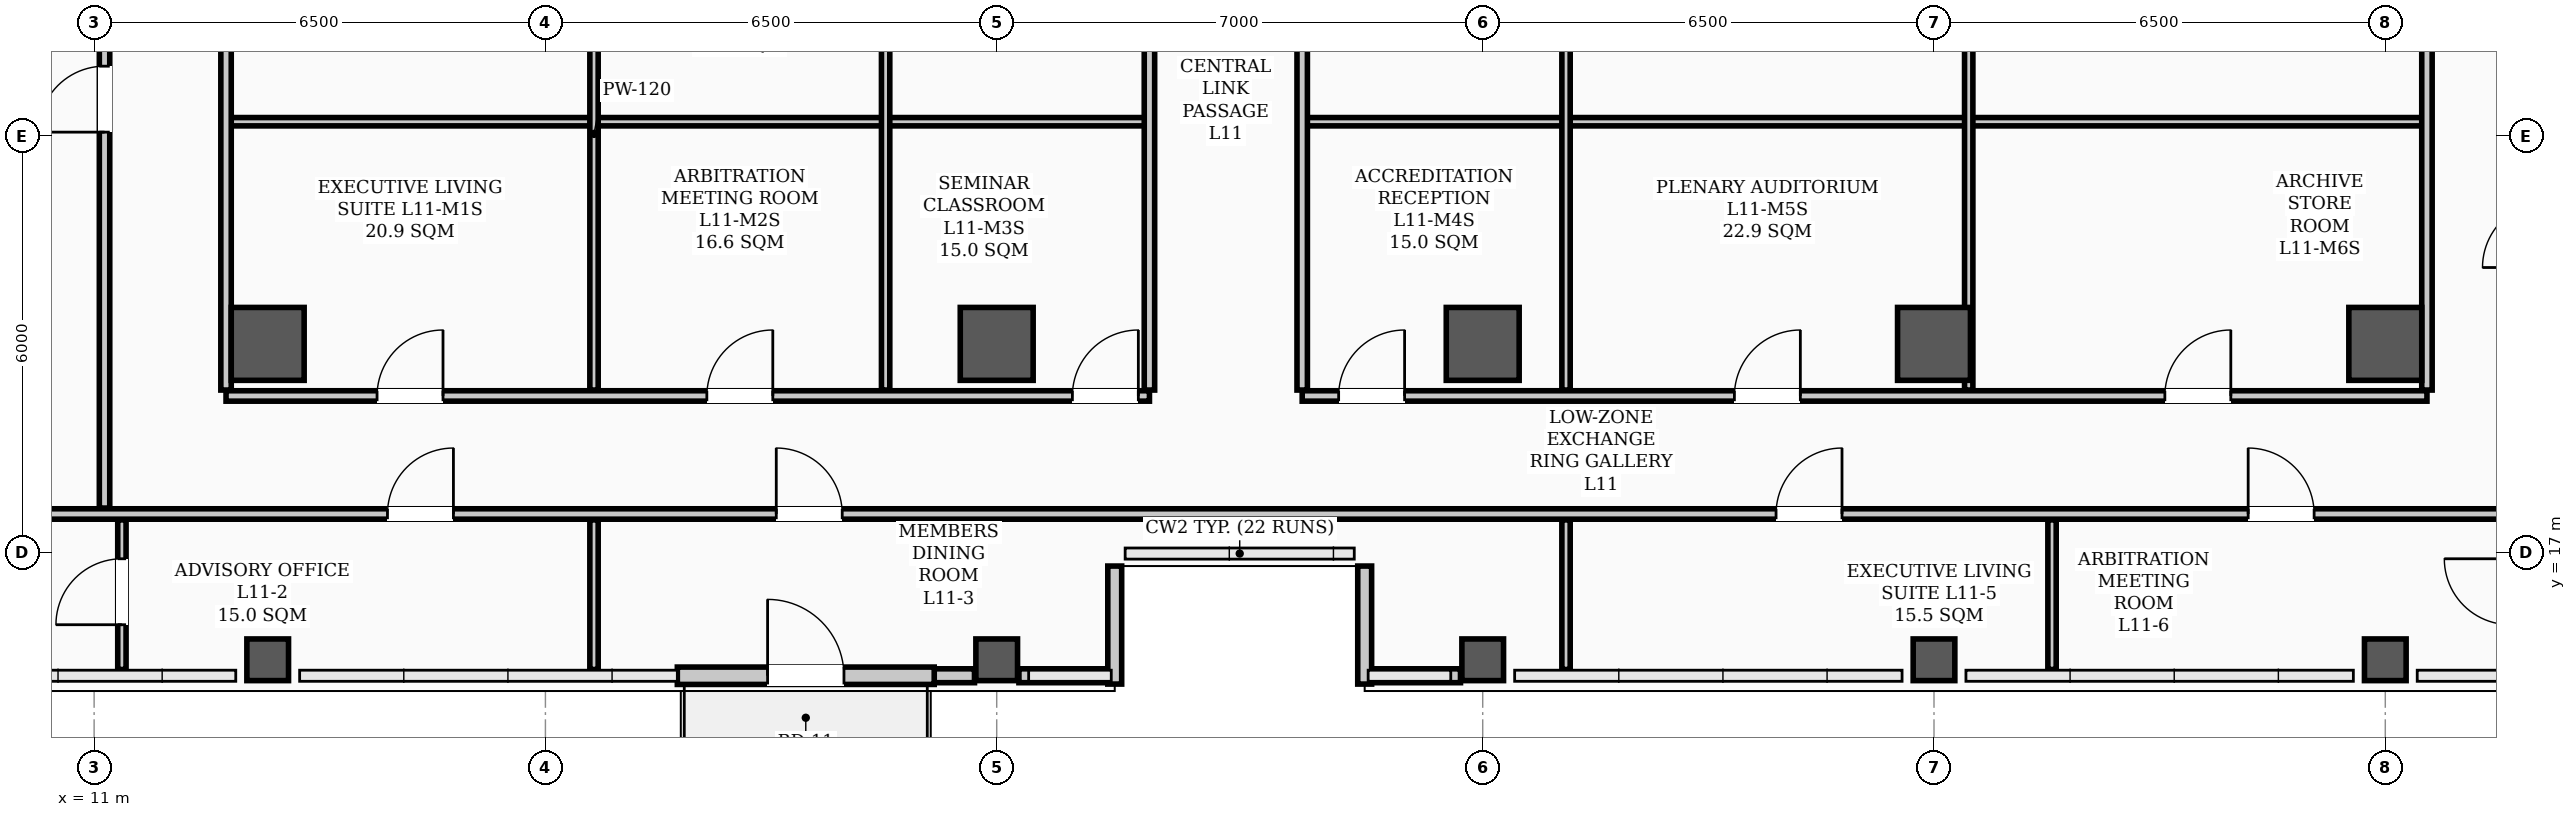
"""IFC4 building model, lengths in metres.
Left out: names, types, materials, properties, quantities, classifications, styles, units other than length and angle.
Written with IfcOpenShell. Run it as: python <this file> out.ifc"""

import sys

from ifc_helpers import new_model, si_unit, direction, frame, frame_2d, origin, origin_2d, place, context, subcontext, project, spatial, rectangle, hollow_rectangle, extrude, element, fill, save


model = new_model("IFC4")
c1 = context("Model", 3, precision=1e-05, world=origin(), true_north=direction((0.0, 1.0)))
c2 = subcontext(c1, "Body", "Model", "MODEL_VIEW")
j1 = project(units=[si_unit("LENGTHUNIT", "METRE"), si_unit("PLANEANGLEUNIT", "RADIAN")], contexts=[c1])
p1 = place(None, origin())
s1 = spatial("IfcSite", under=j1, at=p1, CompositionType="ELEMENT")
p2 = place(p1, origin())
s2 = spatial("IfcBuilding", under=s1, at=p2, CompositionType="ELEMENT")
p3 = place(p2, frame((0.0, 0.0, 46.0)))
s3 = spatial("IfcBuildingStorey", under=s2, at=p3, CompositionType="ELEMENT", Elevation=46.0)
for number, where, z_axis, x_axis in (
    (1, (13.5, 20.0, 0.0), (0.0, 0.0, 1.0), (1.0, 0.0, 0.0)),
    (2, (24.0, 20.0, 0.0), (0.0, 0.0, 1.0), (1.0, 0.0, 0.0)),
    (3, (31.0, 20.0, 0.0), (0.0, 0.0, 1.0), (1.0, 0.0, 0.0)),
    (4, (37.5, 20.0, 0.0), (0.0, 0.0, 1.0), (1.0, 0.0, 0.0)),
    (5, (44.0, 20.0, 0.0), (0.0, 0.0, 1.0), (1.0, 0.0, 0.0)),
):
    element("IfcColumn", number, at=place(p3, frame(where, z_axis=z_axis, x_axis=x_axis)), inside=s3, PredefinedType="COLUMN", context=c2, shape_type="SweptSolid", body=[
        extrude(hollow_rectangle(XDim=1.05, YDim=1.05, WallThickness=0.038, InnerFilletRadius=0.019, OuterFilletRadius=0.057, at=origin_2d()), origin(), (0.0, 0.0, 1.0), 3.9),
    ])
for number, where, z_axis, x_axis in (
    (6, (13.5, 15.45, 0.0), (0.0, 0.0, 1.0), (1.0, 0.0, 0.0)),
    (7, (24.0, 15.45, 0.0), (0.0, 0.0, 1.0), (1.0, 0.0, 0.0)),
    (8, (31.0, 15.45, 0.0), (0.0, 0.0, 1.0), (1.0, 0.0, 0.0)),
    (9, (37.5, 15.45, 0.0), (0.0, 0.0, 1.0), (1.0, 0.0, 0.0)),
    (10, (44.0, 15.45, 0.0), (0.0, 0.0, 1.0), (1.0, 0.0, 0.0)),
):
    element("IfcColumn", number, at=place(p3, frame(where, z_axis=z_axis, x_axis=x_axis)), inside=s3, PredefinedType="COLUMN", context=c2, shape_type="SweptSolid", body=[
        extrude(hollow_rectangle(XDim=0.6, YDim=0.6, WallThickness=0.026, InnerFilletRadius=0.013, OuterFilletRadius=0.039, at=origin_2d()), origin(), (0.0, 0.0, 1.0), 3.9),
    ])
p4 = place(p3, frame((23.1, 15.22, 0.0), z_axis=(0.0, 0.0, 1.0), x_axis=(1.0, 0.0, 0.0)))
e11 = element("IfcWall", 11, at=p4, inside=s3, PredefinedType="PARAPET", context=c2, shape_type="SweptSolid", body=[
    extrude(rectangle(XDim=0.58, YDim=0.2, at=frame_2d((0.29, 0.0))), origin(), (0.0, 0.0, 1.0), 1.2),
])
for number, where, z_axis, x_axis in (
    (12, (24.32, 15.22, 0.0), (0.0, 0.0, 1.0), (1.0, 0.0, 0.0)),
    (13, (29.35, 15.22, 0.0), (0.0, 0.0, 1.0), (1.0, 0.0, 0.0)),
):
    element("IfcWall", number, at=place(p3, frame(where, z_axis=z_axis, x_axis=x_axis)), inside=s3, PredefinedType="PARAPET", context=c2, shape_type="SweptSolid", body=[
        extrude(rectangle(XDim=1.33, YDim=0.2, at=frame_2d((0.665, 0.0))), origin(), (0.0, 0.0, 1.0), 1.2),
    ])
for number, where, z_axis, x_axis in (
    (14, (25.7, 15.1, 0.0), (0.0, 0.0, 1.0), (0.0, 1.0, 0.0)),
    (15, (29.3, 16.8, 0.0), (0.0, 0.0, 1.0), (0.0, -1.0, 0.0)),
):
    element("IfcWall", number, at=place(p3, frame(where, z_axis=z_axis, x_axis=x_axis)), inside=s3, PredefinedType="PARAPET", context=c2, shape_type="SweptSolid", body=[
        extrude(rectangle(XDim=1.7, YDim=0.2, at=frame_2d((0.85, 0.0))), origin(), (0.0, 0.0, 1.0), 1.2),
    ])
p5 = place(p3, frame((19.4, 15.22, 0.0), z_axis=(0.0, 0.0, 1.0), x_axis=(1.0, 0.0, 0.0)))
e16 = element("IfcWall", 16, at=p5, inside=s3, PredefinedType="STANDARD", context=c2, shape_type="SweptSolid", body=[
    extrude(rectangle(XDim=3.7, YDim=0.25, at=frame_2d((1.85, 0.0))), origin(), (0.0, 0.0, 1.0), 3.18),
])
p6 = place(p5, frame((1.3, 0.0, 0.0)))
e17 = element("IfcOpeningElement", 17, at=p6, cuts=e16, PredefinedType="OPENING", context=c2, shape_type="SweptSolid", body=[
    extrude(rectangle(XDim=1.1, YDim=2.2, at=frame_2d((0.55, 1.1))), frame((0.0, 0.135, 0.0), z_axis=(0.0, -1.0, 0.0), x_axis=(1.0, 0.0, 0.0)), (0.0, 0.0, 1.0), 0.27),
])
p7 = place(p3, frame((4.66, 17.55, 0.0), z_axis=(0.0, 0.0, 1.0), x_axis=(1.0, 0.0, 0.0)))
e18 = element("IfcWall", 18, at=p7, inside=s3, PredefinedType="PARTITIONING", context=c2, shape_type="SweptSolid", body=[
    extrude(rectangle(XDim=44.68, YDim=0.15, at=frame_2d((22.34, 0.0))), origin(), (0.0, 0.0, 1.0), 3.1),
])
p8 = place(p7, frame((10.565, 0.0, 0.0)))
e19 = element("IfcOpeningElement", 19, at=p8, cuts=e18, PredefinedType="OPENING", context=c2, shape_type="SweptSolid", body=[
    extrude(rectangle(XDim=0.95, YDim=2.08, at=frame_2d((0.475, 1.04))), frame((0.0, 0.085, 0.0), z_axis=(0.0, -1.0, 0.0), x_axis=(1.0, 0.0, 0.0)), (0.0, 0.0, 1.0), 0.17),
])
p9 = place(p7, frame((16.165, 0.0, 0.0)))
e20 = element("IfcOpeningElement", 20, at=p9, cuts=e18, PredefinedType="OPENING", context=c2, shape_type="SweptSolid", body=[
    extrude(rectangle(XDim=0.95, YDim=2.08, at=frame_2d((0.475, 1.04))), frame((0.0, 0.085, 0.0), z_axis=(0.0, -1.0, 0.0), x_axis=(1.0, 0.0, 0.0)), (0.0, 0.0, 1.0), 0.17),
])
p10 = place(p7, frame((30.565, 0.0, 0.0)))
e21 = element("IfcOpeningElement", 21, at=p10, cuts=e18, PredefinedType="OPENING", context=c2, shape_type="SweptSolid", body=[
    extrude(rectangle(XDim=0.95, YDim=2.08, at=frame_2d((0.475, 1.04))), frame((0.0, 0.085, 0.0), z_axis=(0.0, -1.0, 0.0), x_axis=(1.0, 0.0, 0.0)), (0.0, 0.0, 1.0), 0.17),
])
p11 = place(p7, frame((37.365, 0.0, 0.0)))
e22 = element("IfcOpeningElement", 22, at=p11, cuts=e18, PredefinedType="OPENING", context=c2, shape_type="SweptSolid", body=[
    extrude(rectangle(XDim=0.95, YDim=2.08, at=frame_2d((0.475, 1.04))), frame((0.0, 0.085, 0.0), z_axis=(0.0, -1.0, 0.0), x_axis=(1.0, 0.0, 0.0)), (0.0, 0.0, 1.0), 0.17),
])
p12 = place(p3, frame((12.9, 19.25, 0.0), z_axis=(0.0, 0.0, 1.0), x_axis=(1.0, 0.0, 0.0)))
e23 = element("IfcWall", 23, at=p12, inside=s3, PredefinedType="PARTITIONING", context=c2, shape_type="SweptSolid", body=[
    extrude(rectangle(XDim=13.3, YDim=0.15, at=frame_2d((6.65, 0.0))), origin(), (0.0, 0.0, 1.0), 3.1),
])
p13 = place(p12, frame((2.175, 0.0, 0.0)))
e24 = element("IfcOpeningElement", 24, at=p13, cuts=e23, PredefinedType="OPENING", context=c2, shape_type="SweptSolid", body=[
    extrude(rectangle(XDim=0.95, YDim=2.08, at=frame_2d((0.475, 1.04))), frame((0.0, 0.085, 0.0), z_axis=(0.0, -1.0, 0.0), x_axis=(1.0, 0.0, 0.0)), (0.0, 0.0, 1.0), 0.17),
])
p14 = place(p12, frame((6.925, 0.0, 0.0)))
e25 = element("IfcOpeningElement", 25, at=p14, cuts=e23, PredefinedType="OPENING", context=c2, shape_type="SweptSolid", body=[
    extrude(rectangle(XDim=0.95, YDim=2.08, at=frame_2d((0.475, 1.04))), frame((0.0, 0.085, 0.0), z_axis=(0.0, -1.0, 0.0), x_axis=(1.0, 0.0, 0.0)), (0.0, 0.0, 1.0), 0.17),
])
p15 = place(p12, frame((12.19, 0.0, 0.0)))
e26 = element("IfcOpeningElement", 26, at=p15, cuts=e23, PredefinedType="OPENING", context=c2, shape_type="SweptSolid", body=[
    extrude(rectangle(XDim=0.95, YDim=2.08, at=frame_2d((0.475, 1.04))), frame((0.0, 0.085, 0.0), z_axis=(0.0, -1.0, 0.0), x_axis=(1.0, 0.0, 0.0)), (0.0, 0.0, 1.0), 0.17),
])
p16 = place(p3, frame((28.4, 19.25, 0.0), z_axis=(0.0, 0.0, 1.0), x_axis=(1.0, 0.0, 0.0)))
e27 = element("IfcWall", 27, at=p16, inside=s3, PredefinedType="PARTITIONING", context=c2, shape_type="SweptSolid", body=[
    extrude(rectangle(XDim=16.2, YDim=0.15, at=frame_2d((8.1, 0.0))), origin(), (0.0, 0.0, 1.0), 3.1),
])
p17 = place(p16, frame((0.525, 0.0, 0.0)))
e28 = element("IfcOpeningElement", 28, at=p17, cuts=e27, PredefinedType="OPENING", context=c2, shape_type="SweptSolid", body=[
    extrude(rectangle(XDim=0.95, YDim=2.08, at=frame_2d((0.475, 1.04))), frame((0.0, 0.085, 0.0), z_axis=(0.0, -1.0, 0.0), x_axis=(1.0, 0.0, 0.0)), (0.0, 0.0, 1.0), 0.17),
])
p18 = place(p16, frame((6.225, 0.0, 0.0)))
e29 = element("IfcOpeningElement", 29, at=p18, cuts=e27, PredefinedType="OPENING", context=c2, shape_type="SweptSolid", body=[
    extrude(rectangle(XDim=0.95, YDim=2.08, at=frame_2d((0.475, 1.04))), frame((0.0, 0.085, 0.0), z_axis=(0.0, -1.0, 0.0), x_axis=(1.0, 0.0, 0.0)), (0.0, 0.0, 1.0), 0.17),
])
p19 = place(p16, frame((12.425, 0.0, 0.0)))
e30 = element("IfcOpeningElement", 30, at=p19, cuts=e27, PredefinedType="OPENING", context=c2, shape_type="SweptSolid", body=[
    extrude(rectangle(XDim=0.95, YDim=2.08, at=frame_2d((0.475, 1.04))), frame((0.0, 0.085, 0.0), z_axis=(0.0, -1.0, 0.0), x_axis=(1.0, 0.0, 0.0)), (0.0, 0.0, 1.0), 0.17),
])
p20 = place(p3, frame((12.9, 23.2, 0.0), z_axis=(0.0, 0.0, 1.0), x_axis=(1.0, 0.0, 0.0)))
e31 = element("IfcWall", 31, at=p20, inside=s3, PredefinedType="PARTITIONING", context=c2, shape_type="SweptSolid", body=[
    extrude(rectangle(XDim=5.3, YDim=0.12, at=frame_2d((2.65, 0.0))), origin(), (0.0, 0.0, 1.0), 3.1),
])
p21 = place(p3, frame((18.2, 23.2, 0.0), z_axis=(0.0, 0.0, 1.0), x_axis=(1.0, 0.0, 0.0)))
e32 = element("IfcWall", 32, at=p21, inside=s3, PredefinedType="PARTITIONING", context=c2, shape_type="SweptSolid", body=[
    extrude(rectangle(XDim=4.2, YDim=0.12, at=frame_2d((2.1, 0.0))), origin(), (0.0, 0.0, 1.0), 3.3),
])
for number, where, z_axis, x_axis in (
    (33, (22.4, 23.2, 0.0), (0.0, 0.0, 1.0), (1.0, 0.0, 0.0)),
    (34, (28.4, 23.2, 0.0), (0.0, 0.0, 1.0), (1.0, 0.0, 0.0)),
):
    element("IfcWall", number, at=place(p3, frame(where, z_axis=z_axis, x_axis=x_axis)), inside=s3, PredefinedType="PARTITIONING", context=c2, shape_type="SweptSolid", body=[
        extrude(rectangle(XDim=3.8, YDim=0.12, at=frame_2d((1.9, 0.0))), origin(), (0.0, 0.0, 1.0), 3.1),
    ])
p22 = place(p3, frame((32.2, 23.2, 0.0), z_axis=(0.0, 0.0, 1.0), x_axis=(1.0, 0.0, 0.0)))
e35 = element("IfcWall", 35, at=p22, inside=s3, PredefinedType="PARTITIONING", context=c2, shape_type="SweptSolid", body=[
    extrude(rectangle(XDim=5.8, YDim=0.12, at=frame_2d((2.9, 0.0))), origin(), (0.0, 0.0, 1.0), 3.1),
])
p23 = place(p3, frame((38.0, 23.2, 0.0), z_axis=(0.0, 0.0, 1.0), x_axis=(1.0, 0.0, 0.0)))
e36 = element("IfcWall", 36, at=p23, inside=s3, PredefinedType="PARTITIONING", context=c2, shape_type="SweptSolid", body=[
    extrude(rectangle(XDim=6.6, YDim=0.12, at=frame_2d((3.3, 0.0))), origin(), (0.0, 0.0, 1.0), 3.1),
])
for number, where, z_axis, x_axis in (
    (37, (26.2, 19.335, 0.0), (0.0, 0.0, 1.0), (0.0, 1.0, 0.0)),
    (38, (28.4, 19.335, 0.0), (0.0, 0.0, 1.0), (0.0, 1.0, 0.0)),
):
    element("IfcWall", number, at=place(p3, frame(where, z_axis=z_axis, x_axis=x_axis)), inside=s3, PredefinedType="PARTITIONING", context=c2, shape_type="SweptSolid", body=[
        extrude(rectangle(XDim=7.38, YDim=0.15, at=frame_2d((3.69, 0.0))), origin(), (0.0, 0.0, 1.0), 3.0),
    ])
p24 = place(p3, frame((11.15, 17.635, 0.0), z_axis=(0.0, 0.0, 1.0), x_axis=(0.0, 1.0, 0.0)))
e39 = element("IfcWall", 39, at=p24, inside=s3, PredefinedType="PARTITIONING", context=c2, shape_type="SweptSolid", body=[
    extrude(rectangle(XDim=22.53, YDim=0.15, at=frame_2d((11.265, 0.0))), origin(), (0.0, 0.0, 1.0), 3.0),
])
p25 = place(p24, frame((5.415, 0.0, 0.0)))
e40 = element("IfcOpeningElement", 40, at=p25, cuts=e39, PredefinedType="OPENING", context=c2, shape_type="SweptSolid", body=[
    extrude(rectangle(XDim=0.95, YDim=2.08, at=frame_2d((0.475, 1.04))), frame((0.0, 0.085, 0.0), z_axis=(0.0, -1.0, 0.0), x_axis=(1.0, 0.0, 0.0)), (0.0, 0.0, 1.0), 0.17),
])
p26 = place(p24, frame((16.765, 0.0, 0.0)))
e41 = element("IfcOpeningElement", 41, at=p26, cuts=e39, PredefinedType="OPENING", context=c2, shape_type="SweptSolid", body=[
    extrude(rectangle(XDim=0.95, YDim=2.08, at=frame_2d((0.475, 1.04))), frame((0.0, 0.085, 0.0), z_axis=(0.0, -1.0, 0.0), x_axis=(1.0, 0.0, 0.0)), (0.0, 0.0, 1.0), 0.17),
])
for number, where, z_axis, x_axis in (
    (42, (12.9, 19.335, 0.0), (0.0, 0.0, 1.0), (0.0, 1.0, 0.0)),
    (43, (44.6, 19.335, 0.0), (0.0, 0.0, 1.0), (0.0, 1.0, 0.0)),
):
    element("IfcWall", number, at=place(p3, frame(where, z_axis=z_axis, x_axis=x_axis)), inside=s3, PredefinedType="PARTITIONING", context=c2, shape_type="SweptSolid", body=[
        extrude(rectangle(XDim=7.38, YDim=0.15, at=frame_2d((3.69, 0.0))), origin(), (0.0, 0.0, 1.0), 3.0),
    ])
p27 = place(p3, frame((11.4, 15.31, 0.0), z_axis=(0.0, 0.0, 1.0), x_axis=(0.0, 1.0, 0.0)))
e44 = element("IfcWall", 44, at=p27, inside=s3, PredefinedType="PARTITIONING", context=c2, shape_type="SweptSolid", body=[
    extrude(rectangle(XDim=2.155, YDim=0.12, at=frame_2d((1.078, 0.0))), origin(), (0.0, 0.0, 1.0), 3.72),
])
p28 = place(p27, frame((0.645, 0.0, 0.0)))
e45 = element("IfcOpeningElement", 45, at=p28, cuts=e44, PredefinedType="OPENING", context=c2, shape_type="SweptSolid", body=[
    extrude(rectangle(XDim=0.95, YDim=2.08, at=frame_2d((0.475, 1.04))), frame((0.0, 0.07, 0.0), z_axis=(0.0, -1.0, 0.0), x_axis=(1.0, 0.0, 0.0)), (0.0, 0.0, 1.0), 0.14),
])
for number, where, z_axis, x_axis in (
    (46, (18.2, 15.31, 0.0), (0.0, 0.0, 1.0), (0.0, 1.0, 0.0)),
    (47, (32.2, 15.31, 0.0), (0.0, 0.0, 1.0), (0.0, 1.0, 0.0)),
    (48, (39.2, 15.31, 0.0), (0.0, 0.0, 1.0), (0.0, 1.0, 0.0)),
):
    element("IfcWall", number, at=place(p3, frame(where, z_axis=z_axis, x_axis=x_axis)), inside=s3, PredefinedType="PARTITIONING", context=c2, shape_type="SweptSolid", body=[
        extrude(rectangle(XDim=2.155, YDim=0.12, at=frame_2d((1.078, 0.0))), origin(), (0.0, 0.0, 1.0), 3.212),
    ])
for number, where, z_axis, x_axis in (
    (49, (18.2, 19.335, 0.0), (0.0, 0.0, 1.0), (0.0, 1.0, 0.0)),
    (50, (22.4, 19.335, 0.0), (0.0, 0.0, 1.0), (0.0, 1.0, 0.0)),
    (51, (32.2, 19.335, 0.0), (0.0, 0.0, 1.0), (0.0, 1.0, 0.0)),
    (52, (38.0, 19.335, 0.0), (0.0, 0.0, 1.0), (0.0, 1.0, 0.0)),
):
    element("IfcWall", number, at=place(p3, frame(where, z_axis=z_axis, x_axis=x_axis)), inside=s3, PredefinedType="PARTITIONING", context=c2, shape_type="SweptSolid", body=[
        extrude(rectangle(XDim=7.38, YDim=0.12, at=frame_2d((3.69, 0.0))), origin(), (0.0, 0.0, 1.0), 3.0),
    ])
p29 = place(p6, origin())
e53 = element("IfcDoor", 53, at=p29, inside=s3, OperationType="SINGLE_SWING_LEFT", PredefinedType="DOOR", context=c2, shape_type="SweptSolid", body=[
    extrude(rectangle(XDim=1.1, YDim=2.2, at=frame_2d((0.55, 1.1))), frame((0.0, 0.025, 0.0), z_axis=(0.0, -1.0, 0.0), x_axis=(1.0, 0.0, 0.0)), (0.0, 0.0, 1.0), 0.05),
])
fill(e17, e53)
p30 = place(p28, origin())
e54 = element("IfcDoor", 54, at=p30, inside=s3, OperationType="SINGLE_SWING_LEFT", PredefinedType="DOOR", context=c2, shape_type="SweptSolid", body=[
    extrude(rectangle(XDim=0.95, YDim=2.08, at=frame_2d((0.475, 1.04))), frame((0.0, 0.025, 0.0), z_axis=(0.0, -1.0, 0.0), x_axis=(1.0, 0.0, 0.0)), (0.0, 0.0, 1.0), 0.05),
])
fill(e45, e54)
p31 = place(p8, origin())
e55 = element("IfcDoor", 55, at=p31, inside=s3, OperationType="SINGLE_SWING_RIGHT", PredefinedType="DOOR", context=c2, shape_type="SweptSolid", body=[
    extrude(rectangle(XDim=0.95, YDim=2.08, at=frame_2d((0.475, 1.04))), frame((0.0, 0.025, 0.0), z_axis=(0.0, -1.0, 0.0), x_axis=(1.0, 0.0, 0.0)), (0.0, 0.0, 1.0), 0.05),
])
fill(e19, e55)
p32 = place(p9, origin())
e56 = element("IfcDoor", 56, at=p32, inside=s3, OperationType="SINGLE_SWING_LEFT", PredefinedType="DOOR", context=c2, shape_type="SweptSolid", body=[
    extrude(rectangle(XDim=0.95, YDim=2.08, at=frame_2d((0.475, 1.04))), frame((0.0, 0.025, 0.0), z_axis=(0.0, -1.0, 0.0), x_axis=(1.0, 0.0, 0.0)), (0.0, 0.0, 1.0), 0.05),
])
fill(e20, e56)
p33 = place(p10, origin())
e57 = element("IfcDoor", 57, at=p33, inside=s3, OperationType="SINGLE_SWING_RIGHT", PredefinedType="DOOR", context=c2, shape_type="SweptSolid", body=[
    extrude(rectangle(XDim=0.95, YDim=2.08, at=frame_2d((0.475, 1.04))), frame((0.0, 0.025, 0.0), z_axis=(0.0, -1.0, 0.0), x_axis=(1.0, 0.0, 0.0)), (0.0, 0.0, 1.0), 0.05),
])
fill(e21, e57)
p34 = place(p11, origin())
e58 = element("IfcDoor", 58, at=p34, inside=s3, OperationType="SINGLE_SWING_LEFT", PredefinedType="DOOR", context=c2, shape_type="SweptSolid", body=[
    extrude(rectangle(XDim=0.95, YDim=2.08, at=frame_2d((0.475, 1.04))), frame((0.0, 0.025, 0.0), z_axis=(0.0, -1.0, 0.0), x_axis=(1.0, 0.0, 0.0)), (0.0, 0.0, 1.0), 0.05),
])
fill(e22, e58)
p35 = place(p13, origin())
e59 = element("IfcDoor", 59, at=p35, inside=s3, OperationType="SINGLE_SWING_RIGHT", PredefinedType="DOOR", context=c2, shape_type="SweptSolid", body=[
    extrude(rectangle(XDim=0.95, YDim=2.08, at=frame_2d((0.475, 1.04))), frame((0.0, 0.025, 0.0), z_axis=(0.0, -1.0, 0.0), x_axis=(1.0, 0.0, 0.0)), (0.0, 0.0, 1.0), 0.05),
])
fill(e24, e59)
p36 = place(p14, origin())
e60 = element("IfcDoor", 60, at=p36, inside=s3, OperationType="SINGLE_SWING_RIGHT", PredefinedType="DOOR", context=c2, shape_type="SweptSolid", body=[
    extrude(rectangle(XDim=0.95, YDim=2.08, at=frame_2d((0.475, 1.04))), frame((0.0, 0.025, 0.0), z_axis=(0.0, -1.0, 0.0), x_axis=(1.0, 0.0, 0.0)), (0.0, 0.0, 1.0), 0.05),
])
fill(e25, e60)
p37 = place(p15, origin())
e61 = element("IfcDoor", 61, at=p37, inside=s3, OperationType="SINGLE_SWING_RIGHT", PredefinedType="DOOR", context=c2, shape_type="SweptSolid", body=[
    extrude(rectangle(XDim=0.95, YDim=2.08, at=frame_2d((0.475, 1.04))), frame((0.0, 0.025, 0.0), z_axis=(0.0, -1.0, 0.0), x_axis=(1.0, 0.0, 0.0)), (0.0, 0.0, 1.0), 0.05),
])
fill(e26, e61)
p38 = place(p17, origin())
e62 = element("IfcDoor", 62, at=p38, inside=s3, OperationType="SINGLE_SWING_RIGHT", PredefinedType="DOOR", context=c2, shape_type="SweptSolid", body=[
    extrude(rectangle(XDim=0.95, YDim=2.08, at=frame_2d((0.475, 1.04))), frame((0.0, 0.025, 0.0), z_axis=(0.0, -1.0, 0.0), x_axis=(1.0, 0.0, 0.0)), (0.0, 0.0, 1.0), 0.05),
])
fill(e28, e62)
p39 = place(p18, origin())
e63 = element("IfcDoor", 63, at=p39, inside=s3, OperationType="SINGLE_SWING_RIGHT", PredefinedType="DOOR", context=c2, shape_type="SweptSolid", body=[
    extrude(rectangle(XDim=0.95, YDim=2.08, at=frame_2d((0.475, 1.04))), frame((0.0, 0.025, 0.0), z_axis=(0.0, -1.0, 0.0), x_axis=(1.0, 0.0, 0.0)), (0.0, 0.0, 1.0), 0.05),
])
fill(e29, e63)
p40 = place(p19, origin())
e64 = element("IfcDoor", 64, at=p40, inside=s3, OperationType="SINGLE_SWING_RIGHT", PredefinedType="DOOR", context=c2, shape_type="SweptSolid", body=[
    extrude(rectangle(XDim=0.95, YDim=2.08, at=frame_2d((0.475, 1.04))), frame((0.0, 0.025, 0.0), z_axis=(0.0, -1.0, 0.0), x_axis=(1.0, 0.0, 0.0)), (0.0, 0.0, 1.0), 0.05),
])
fill(e30, e64)
p41 = place(p25, origin())
e65 = element("IfcDoor", 65, at=p41, inside=s3, OperationType="SINGLE_SWING_LEFT", PredefinedType="DOOR", context=c2, shape_type="SweptSolid", body=[
    extrude(rectangle(XDim=0.95, YDim=2.08, at=frame_2d((0.475, 1.04))), frame((0.0, 0.025, 0.0), z_axis=(0.0, -1.0, 0.0), x_axis=(1.0, 0.0, 0.0)), (0.0, 0.0, 1.0), 0.05),
])
fill(e40, e65)
save(model, sys.argv[1])
